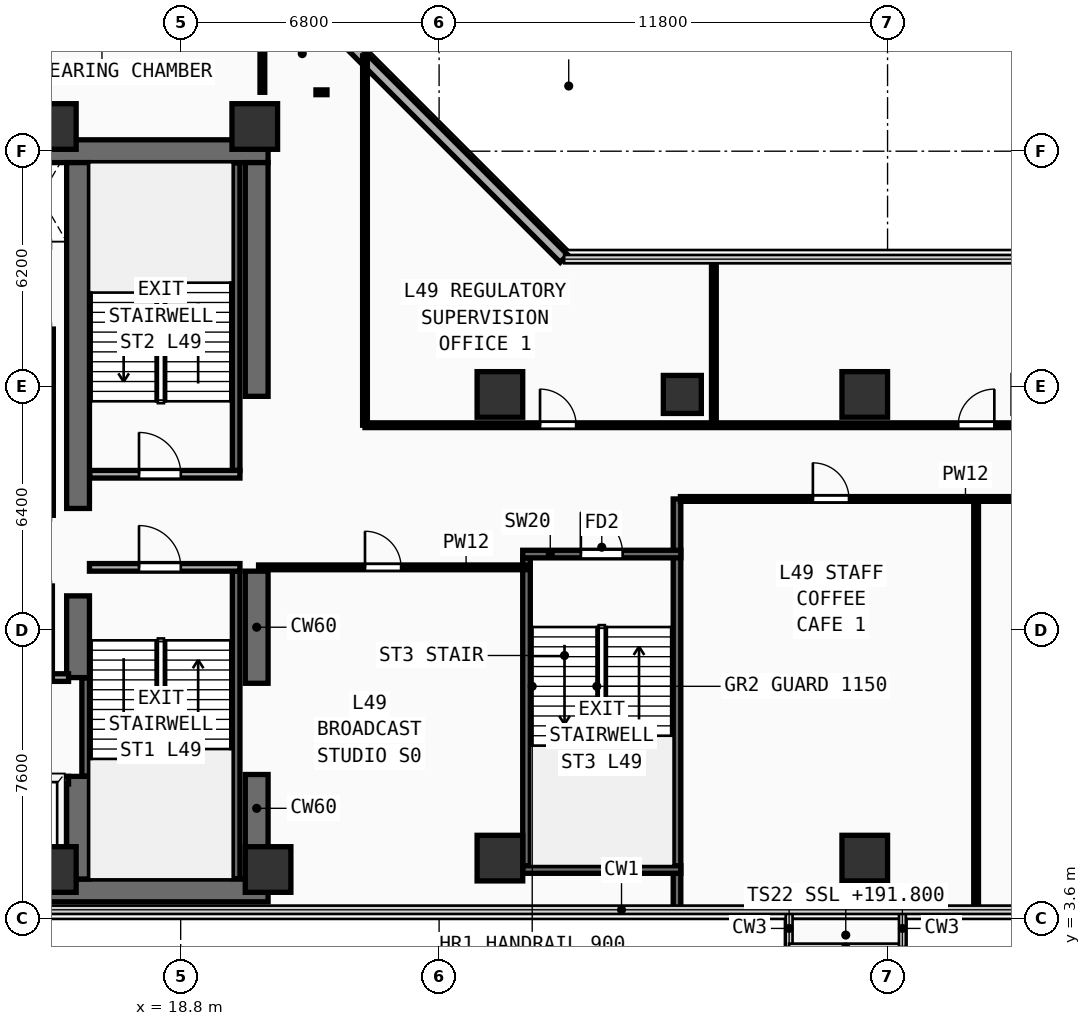
"""IFC4 building model, lengths in metres.
Left out: names, types, materials, properties, quantities, classifications, styles, units other than length and angle.
Written with IfcOpenShell. Run it as: python <this file> out.ifc"""

import sys

from ifc_helpers import new_model, si_unit, direction, frame, frame_2d, origin, origin_2d, place, context, subcontext, project, spatial, rectangle, extrude, element, fill, save


model = new_model("IFC4")
c1 = context("Model", 3, precision=1e-05, world=origin(), true_north=direction((0.0, 1.0)))
c2 = subcontext(c1, "Body", "Model", "MODEL_VIEW")
j1 = project(units=[si_unit("LENGTHUNIT", "METRE"), si_unit("PLANEANGLEUNIT", "RADIAN")], contexts=[c1])
p1 = place(None, origin())
s1 = spatial("IfcSite", under=j1, at=p1, CompositionType="ELEMENT")
p2 = place(p1, origin())
s2 = spatial("IfcBuilding", under=s1, at=p2, CompositionType="ELEMENT")
p3 = place(p2, frame((0.0, 0.0, 191.8)))
s3 = spatial("IfcBuildingStorey", under=s2, at=p3, CompositionType="ELEMENT", Elevation=191.8)
for number, where, z_axis, x_axis in (
    (1, (7.15, 4.35, 0.0), (0.0, 0.0, 1.0), (1.0, 0.0, 0.0)),
    (2, (7.15, 23.8, 0.0), (0.0, 0.0, 1.0), (1.0, 0.0, 0.0)),
):
    element("IfcWall", number, at=place(p3, frame(where, z_axis=z_axis, x_axis=x_axis)), inside=s3, PredefinedType="SHEAR", context=c2, shape_type="SweptSolid", body=[
        extrude(rectangle(XDim=13.95, YDim=0.6, at=frame_2d((6.975, 0.0))), origin(), (0.0, 0.0, 1.0), 3.56),
    ])
p4 = place(p3, frame((20.8, 4.65, 0.0), z_axis=(0.0, 0.0, 1.0), x_axis=(0.0, 1.0, 0.0)))
e3 = element("IfcWall", 3, at=p4, inside=s3, PredefinedType="SHEAR", context=c2, shape_type="SweptSolid", body=[
    extrude(rectangle(XDim=2.75, YDim=0.6, at=frame_2d((1.375, 0.0))), origin(), (0.0, 0.0, 1.0), 3.56),
])
p5 = place(p3, frame((20.8, 9.8, 0.0), z_axis=(0.0, 0.0, 1.0), x_axis=(0.0, 1.0, 0.0)))
e4 = element("IfcWall", 4, at=p5, inside=s3, PredefinedType="SHEAR", context=c2, shape_type="SweptSolid", body=[
    extrude(rectangle(XDim=2.95, YDim=0.6, at=frame_2d((1.475, 0.0))), origin(), (0.0, 0.0, 1.0), 3.56),
])
p6 = place(p3, frame((20.8, 17.35, 0.0), z_axis=(0.0, 0.0, 1.0), x_axis=(0.0, 1.0, 0.0)))
e5 = element("IfcWall", 5, at=p6, inside=s3, PredefinedType="SHEAR", context=c2, shape_type="SweptSolid", body=[
    extrude(rectangle(XDim=6.15, YDim=0.6, at=frame_2d((3.075, 0.0))), origin(), (0.0, 0.0, 1.0), 3.56),
])
p7 = place(p3, frame((16.1, 4.65, 0.0), z_axis=(0.0, 0.0, 1.0), x_axis=(0.0, 1.0, 0.0)))
e6 = element("IfcWall", 6, at=p7, inside=s3, PredefinedType="SHEAR", context=c2, shape_type="SweptSolid", body=[
    extrude(rectangle(XDim=2.7, YDim=0.6, at=frame_2d((1.35, 0.0))), origin(), (0.0, 0.0, 1.0), 3.56),
])
p8 = place(p3, frame((16.1, 9.95, 0.0), z_axis=(0.0, 0.0, 1.0), x_axis=(0.0, 1.0, 0.0)))
e7 = element("IfcWall", 7, at=p8, inside=s3, PredefinedType="SHEAR", context=c2, shape_type="SweptSolid", body=[
    extrude(rectangle(XDim=2.15, YDim=0.6, at=frame_2d((1.075, 0.0))), origin(), (0.0, 0.0, 1.0), 3.56),
])
p9 = place(p3, frame((16.1, 14.4, 0.0), z_axis=(0.0, 0.0, 1.0), x_axis=(0.0, 1.0, 0.0)))
e8 = element("IfcWall", 8, at=p9, inside=s3, PredefinedType="SHEAR", context=c2, shape_type="SweptSolid", body=[
    extrude(rectangle(XDim=9.1, YDim=0.6, at=frame_2d((4.55, 0.0))), origin(), (0.0, 0.0, 1.0), 3.56),
])
for number, where, z_axis, x_axis in (
    (9, (15.45, 4.9, 0.0), (0.0, 0.0, 1.0), (1.0, 0.0, 0.0)),
    (10, (21.1, 4.9, 0.0), (0.0, 0.0, 1.0), (1.0, 0.0, 0.0)),
    (11, (15.45, 24.45, 0.0), (0.0, 0.0, 1.0), (1.0, 0.0, 0.0)),
    (12, (20.75, 24.45, 0.0), (0.0, 0.0, 1.0), (1.0, 0.0, 0.0)),
    (13, (27.2, 5.2, 0.0), (0.0, 0.0, 1.0), (1.0, 0.0, 0.0)),
    (14, (36.8, 5.2, 0.0), (0.0, 0.0, 1.0), (1.0, 0.0, 0.0)),
    (15, (27.2, 17.4, 0.0), (0.0, 0.0, 1.0), (1.0, 0.0, 0.0)),
    (16, (36.8, 17.4, 0.0), (0.0, 0.0, 1.0), (1.0, 0.0, 0.0)),
):
    element("IfcColumn", number, at=place(p3, frame(where, z_axis=z_axis, x_axis=x_axis)), inside=s3, PredefinedType="COLUMN", context=c2, shape_type="SweptSolid", body=[
        extrude(rectangle(XDim=1.2, YDim=1.2, at=origin_2d()), origin(), (0.0, 0.0, 1.0), 3.56),
    ])
p10 = place(p3, frame((32.0, 17.4, 0.0), z_axis=(0.0, 0.0, 1.0), x_axis=(1.0, 0.0, 0.0)))
e17 = element("IfcColumn", 17, at=p10, inside=s3, PredefinedType="COLUMN", context=c2, shape_type="SweptSolid", body=[
    extrude(rectangle(XDim=1.0, YDim=1.0, at=origin_2d()), origin(), (0.0, 0.0, 1.0), 3.56),
])
p11 = place(p3, frame((28.885, 20.975, 0.0), z_axis=(0.0, 0.0, 1.0), x_axis=(-0.707106781187, 0.707106781187, 0.0)))
e18 = element("IfcWall", 18, at=p11, inside=s3, PredefinedType="SOLIDWALL", context=c2, shape_type="SweptSolid", body=[
    extrude(rectangle(XDim=9.207, YDim=0.28, at=frame_2d((4.603, 0.0))), origin(), (0.0, 0.0, 1.0), 3.56),
])
p12 = place(p3, frame((16.3, 7.36, 0.0), z_axis=(0.0, 0.0, 1.0), x_axis=(0.0, 1.0, 0.0)))
e19 = element("IfcWall", 19, at=p12, inside=s3, PredefinedType="SHEAR", context=c2, shape_type="SweptSolid", body=[
    extrude(rectangle(XDim=2.58, YDim=0.2, at=frame_2d((1.29, 0.0))), origin(), (0.0, 0.0, 1.0), 3.56),
])
p13 = place(p3, frame((20.26, 4.66, 0.0), z_axis=(0.0, 0.0, 1.0), x_axis=(0.0, 1.0, 0.0)))
e20 = element("IfcWall", 20, at=p13, inside=s3, PredefinedType="SHEAR", context=c2, shape_type="SweptSolid", body=[
    extrude(rectangle(XDim=8.09, YDim=0.2, at=frame_2d((4.045, 0.0))), origin(), (0.0, 0.0, 1.0), 3.56),
])
p14 = place(p3, frame((16.4, 12.85, 0.0), z_axis=(0.0, 0.0, 1.0), x_axis=(1.0, 0.0, 0.0)))
e21 = element("IfcWall", 21, at=p14, inside=s3, PredefinedType="PARTITIONING", context=c2, shape_type="SweptSolid", body=[
    extrude(rectangle(XDim=3.96, YDim=0.2, at=frame_2d((1.98, 0.0))), origin(), (0.0, 0.0, 1.0), 3.56),
])
p15 = place(p14, frame((1.304, 0.0, 0.0)))
e22 = element("IfcOpeningElement", 22, at=p15, cuts=e21, PredefinedType="OPENING", context=c2, shape_type="SweptSolid", body=[
    extrude(rectangle(XDim=1.1, YDim=2.2, at=frame_2d((0.55, 1.1))), frame((0.0, 0.11, 0.0), z_axis=(0.0, -1.0, 0.0), x_axis=(1.0, 0.0, 0.0)), (0.0, 0.0, 1.0), 0.22),
])
p16 = place(p3, frame((20.26, 15.4, 0.0), z_axis=(0.0, 0.0, 1.0), x_axis=(0.0, 1.0, 0.0)))
e23 = element("IfcWall", 23, at=p16, inside=s3, PredefinedType="SHEAR", context=c2, shape_type="SweptSolid", body=[
    extrude(rectangle(XDim=8.09, YDim=0.2, at=frame_2d((4.045, 0.0))), origin(), (0.0, 0.0, 1.0), 3.56),
])
p17 = place(p3, frame((16.41, 15.3, 0.0), z_axis=(0.0, 0.0, 1.0), x_axis=(1.0, 0.0, 0.0)))
e24 = element("IfcWall", 24, at=p17, inside=s3, PredefinedType="PARTITIONING", context=c2, shape_type="SweptSolid", body=[
    extrude(rectangle(XDim=3.95, YDim=0.2, at=frame_2d((1.975, 0.0))), origin(), (0.0, 0.0, 1.0), 3.56),
])
p18 = place(p17, frame((1.294, 0.0, 0.0)))
e25 = element("IfcOpeningElement", 25, at=p18, cuts=e24, PredefinedType="OPENING", context=c2, shape_type="SweptSolid", body=[
    extrude(rectangle(XDim=1.1, YDim=2.2, at=frame_2d((0.55, 1.1))), frame((0.0, 0.11, 0.0), z_axis=(0.0, -1.0, 0.0), x_axis=(1.0, 0.0, 0.0)), (0.0, 0.0, 1.0), 0.22),
])
p19 = place(p3, frame((27.9, 5.0, 0.0), z_axis=(0.0, 0.0, 1.0), x_axis=(0.0, 1.0, 0.0)))
e26 = element("IfcWall", 26, at=p19, inside=s3, PredefinedType="SHEAR", context=c2, shape_type="SweptSolid", body=[
    extrude(rectangle(XDim=8.1, YDim=0.2, at=frame_2d((4.05, 0.0))), origin(), (0.0, 0.0, 1.0), 3.56),
])
p20 = place(p3, frame((31.86, 3.84, 0.0), z_axis=(0.0, 0.0, 1.0), x_axis=(0.0, 1.0, 0.0)))
e27 = element("IfcWall", 27, at=p20, inside=s3, PredefinedType="SHEAR", context=c2, shape_type="SweptSolid", body=[
    extrude(rectangle(XDim=10.81, YDim=0.2, at=frame_2d((5.405, 0.0))), origin(), (0.0, 0.0, 1.0), 3.56),
])
p21 = place(p3, frame((27.8, 4.9, 0.0), z_axis=(0.0, 0.0, 1.0), x_axis=(1.0, 0.0, 0.0)))
e28 = element("IfcWall", 28, at=p21, inside=s3, PredefinedType="SHEAR", context=c2, shape_type="SweptSolid", body=[
    extrude(rectangle(XDim=4.16, YDim=0.2, at=frame_2d((2.08, 0.0))), origin(), (0.0, 0.0, 1.0), 3.56),
])
p22 = place(p3, frame((27.8, 13.2, 0.0), z_axis=(0.0, 0.0, 1.0), x_axis=(1.0, 0.0, 0.0)))
e29 = element("IfcWall", 29, at=p22, inside=s3, PredefinedType="SHEAR", context=c2, shape_type="SweptSolid", body=[
    extrude(rectangle(XDim=4.16, YDim=0.2, at=frame_2d((2.08, 0.0))), origin(), (0.0, 0.0, 1.0), 3.56),
])
p23 = place(p22, frame((1.53, 0.0, 0.0)))
e30 = element("IfcOpeningElement", 30, at=p23, cuts=e29, PredefinedType="OPENING", context=c2, shape_type="SweptSolid", body=[
    extrude(rectangle(XDim=1.1, YDim=2.2, at=frame_2d((0.55, 1.1))), frame((0.0, 0.11, 0.0), z_axis=(0.0, -1.0, 0.0), x_axis=(1.0, 0.0, 0.0)), (0.0, 0.0, 1.0), 0.22),
])
p24 = place(p3, frame((7.5, 7.25, 0.0), z_axis=(0.0, 0.0, 1.0), x_axis=(1.0, 0.0, 0.0)))
e31 = element("IfcWall", 31, at=p24, inside=s3, PredefinedType="PARTITIONING", context=c2, shape_type="SweptSolid", body=[
    extrude(rectangle(XDim=8.35, YDim=0.2, at=frame_2d((4.175, 0.0))), origin(), (0.0, 0.0, 1.0), 3.56),
])
p25 = place(p24, frame((0.53, 0.0, 0.0)))
e32 = element("IfcOpeningElement", 32, at=p25, cuts=e31, PredefinedType="OPENING", context=c2, shape_type="SweptSolid", body=[
    extrude(rectangle(XDim=1.1, YDim=2.2, at=frame_2d((0.55, 1.1))), frame((0.0, 0.11, 0.0), z_axis=(0.0, -1.0, 0.0), x_axis=(1.0, 0.0, 0.0)), (0.0, 0.0, 1.0), 0.22),
])
p26 = place(p24, frame((2.37, 0.0, 0.0)))
e33 = element("IfcOpeningElement", 33, at=p26, cuts=e31, PredefinedType="OPENING", context=c2, shape_type="SweptSolid", body=[
    extrude(rectangle(XDim=1.1, YDim=2.2, at=frame_2d((0.55, 1.1))), frame((0.0, 0.11, 0.0), z_axis=(0.0, -1.0, 0.0), x_axis=(1.0, 0.0, 0.0)), (0.0, 0.0, 1.0), 0.22),
])
p27 = place(p24, frame((4.33, 0.0, 0.0)))
e34 = element("IfcOpeningElement", 34, at=p27, cuts=e31, PredefinedType="OPENING", context=c2, shape_type="SweptSolid", body=[
    extrude(rectangle(XDim=1.1, YDim=2.2, at=frame_2d((0.55, 1.1))), frame((0.0, 0.11, 0.0), z_axis=(0.0, -1.0, 0.0), x_axis=(1.0, 0.0, 0.0)), (0.0, 0.0, 1.0), 0.22),
])
p28 = place(p24, frame((6.5, 0.0, 0.0)))
e35 = element("IfcOpeningElement", 35, at=p28, cuts=e31, PredefinedType="OPENING", context=c2, shape_type="SweptSolid", body=[
    extrude(rectangle(XDim=1.1, YDim=2.2, at=frame_2d((0.55, 1.1))), frame((0.0, 0.11, 0.0), z_axis=(0.0, -1.0, 0.0), x_axis=(1.0, 0.0, 0.0)), (0.0, 0.0, 1.0), 0.22),
])
p29 = place(p3, frame((7.5, 9.95, 0.0), z_axis=(0.0, 0.0, 1.0), x_axis=(1.0, 0.0, 0.0)))
e36 = element("IfcWall", 36, at=p29, inside=s3, PredefinedType="PARTITIONING", context=c2, shape_type="SweptSolid", body=[
    extrude(rectangle(XDim=8.35, YDim=0.2, at=frame_2d((4.175, 0.0))), origin(), (0.0, 0.0, 1.0), 3.56),
])
p30 = place(p3, frame((15.35, 9.95, 0.0), z_axis=(0.0, 0.0, 1.0), x_axis=(0.0, 1.0, 0.0)))
e37 = element("IfcWall", 37, at=p30, inside=s3, PredefinedType="PARTITIONING", context=c2, shape_type="SweptSolid", body=[
    extrude(rectangle(XDim=2.41, YDim=0.15, at=frame_2d((1.205, 0.0))), origin(), (0.0, 0.0, 1.0), 3.56),
])
p31 = place(p3, frame((15.35, 14.22, 0.0), z_axis=(0.0, 0.0, 1.0), x_axis=(0.0, 1.0, 0.0)))
e38 = element("IfcWall", 38, at=p31, inside=s3, PredefinedType="PARTITIONING", context=c2, shape_type="SweptSolid", body=[
    extrude(rectangle(XDim=2.23, YDim=0.2, at=frame_2d((1.115, 0.0))), origin(), (0.0, 0.0, 1.0), 3.56),
])
p32 = place(p3, frame((15.35, 16.45, 0.0), z_axis=(0.0, 0.0, 1.0), x_axis=(0.0, 1.0, 0.0)))
e39 = element("IfcWall", 39, at=p32, inside=s3, PredefinedType="PARTITIONING", context=c2, shape_type="SweptSolid", body=[
    extrude(rectangle(XDim=2.67, YDim=0.2, at=frame_2d((1.335, 0.0))), origin(), (0.0, 0.0, 1.0), 3.56),
])
p33 = place(p3, frame((20.85, 12.85, 0.0), z_axis=(0.0, 0.0, 1.0), x_axis=(1.0, 0.0, 0.0)))
e40 = element("IfcWall", 40, at=p33, inside=s3, PredefinedType="PARTITIONING", context=c2, shape_type="SweptSolid", body=[
    extrude(rectangle(XDim=7.05, YDim=0.125, at=frame_2d((3.525, 0.0))), origin(), (0.0, 0.0, 1.0), 3.56),
])
p34 = place(p33, frame((2.8, 0.0, 0.0)))
e41 = element("IfcOpeningElement", 41, at=p34, cuts=e40, PredefinedType="OPENING", context=c2, shape_type="SweptSolid", body=[
    extrude(rectangle(XDim=0.95, YDim=2.15, at=frame_2d((0.475, 1.075))), frame((0.0, 0.073, 0.0), z_axis=(0.0, -1.0, 0.0), x_axis=(1.0, 0.0, 0.0)), (0.0, 0.0, 1.0), 0.145),
])
p35 = place(p3, frame((20.95, 25.35, 0.0), z_axis=(0.0, 0.0, 1.0), x_axis=(0.0, 1.0, 0.0)))
e42 = element("IfcWall", 42, at=p35, inside=s3, PredefinedType="PARTITIONING", context=c2, shape_type="SweptSolid", body=[
    extrude(rectangle(XDim=9.25, YDim=0.125, at=frame_2d((4.625, 0.0))), origin(), (0.0, 0.0, 1.0), 3.56),
])
p36 = place(p35, frame((3.973, 0.0, 0.0)))
e43 = element("IfcOpeningElement", 43, at=p36, cuts=e42, PredefinedType="OPENING", context=c2, shape_type="SweptSolid", body=[
    extrude(rectangle(XDim=0.85, YDim=2.15, at=frame_2d((0.425, 1.075))), frame((0.0, 0.073, 0.0), z_axis=(0.0, -1.0, 0.0), x_axis=(1.0, 0.0, 0.0)), (0.0, 0.0, 1.0), 0.145),
])
p37 = place(p3, frame((22.65, 25.35, 0.0), z_axis=(0.0, 0.0, 1.0), x_axis=(-1.0, 0.0, 0.0)))
e44 = element("IfcWall", 44, at=p37, inside=s3, PredefinedType="PARTITIONING", context=c2, shape_type="SweptSolid", body=[
    extrude(rectangle(XDim=0.29, YDim=0.125, at=frame_2d((0.145, 0.0))), origin(), (0.0, 0.0, 1.0), 3.56),
])
p38 = place(p3, frame((31.95, 14.65, 0.0), z_axis=(0.0, 0.0, 1.0), x_axis=(1.0, 0.0, 0.0)))
e45 = element("IfcWall", 45, at=p38, inside=s3, PredefinedType="PARTITIONING", context=c2, shape_type="SweptSolid", body=[
    extrude(rectangle(XDim=15.25, YDim=0.125, at=frame_2d((7.625, 0.0))), origin(), (0.0, 0.0, 1.0), 3.56),
])
p39 = place(p38, frame((3.485, 0.0, 0.0)))
e46 = element("IfcOpeningElement", 46, at=p39, cuts=e45, PredefinedType="OPENING", context=c2, shape_type="SweptSolid", body=[
    extrude(rectangle(XDim=0.95, YDim=2.15, at=frame_2d((0.475, 1.075))), frame((0.0, 0.073, 0.0), z_axis=(0.0, -1.0, 0.0), x_axis=(1.0, 0.0, 0.0)), (0.0, 0.0, 1.0), 0.145),
])
p40 = place(p38, frame((10.565, 0.0, 0.0)))
e47 = element("IfcOpeningElement", 47, at=p40, cuts=e45, PredefinedType="OPENING", context=c2, shape_type="SweptSolid", body=[
    extrude(rectangle(XDim=0.95, YDim=2.15, at=frame_2d((0.475, 1.075))), frame((0.0, 0.073, 0.0), z_axis=(0.0, -1.0, 0.0), x_axis=(1.0, 0.0, 0.0)), (0.0, 0.0, 1.0), 0.145),
])
p41 = place(p3, frame((39.73, 3.84, 0.0), z_axis=(0.0, 0.0, 1.0), x_axis=(0.0, 1.0, 0.0)))
e48 = element("IfcWall", 48, at=p41, inside=s3, PredefinedType="PARTITIONING", context=c2, shape_type="SweptSolid", body=[
    extrude(rectangle(XDim=10.81, YDim=0.125, at=frame_2d((5.405, 0.0))), origin(), (0.0, 0.0, 1.0), 3.56),
])
p42 = place(p3, frame((23.65, 16.59, 0.0), z_axis=(0.0, 0.0, 1.0), x_axis=(0.0, 1.0, 0.0)))
e49 = element("IfcWall", 49, at=p42, inside=s3, PredefinedType="PARTITIONING", context=c2, shape_type="SweptSolid", body=[
    extrude(rectangle(XDim=9.72, YDim=0.125, at=frame_2d((4.86, 0.0))), origin(), (0.0, 0.0, 1.0), 3.56),
])
p43 = place(p3, frame((23.65, 16.59, 0.0), z_axis=(0.0, 0.0, 1.0), x_axis=(1.0, 0.0, 0.0)))
e50 = element("IfcWall", 50, at=p43, inside=s3, PredefinedType="PARTITIONING", context=c2, shape_type="SweptSolid", body=[
    extrude(rectangle(XDim=23.55, YDim=0.125, at=frame_2d((11.775, 0.0))), origin(), (0.0, 0.0, 1.0), 3.56),
])
p44 = place(p43, frame((4.606, 0.0, 0.0)))
e51 = element("IfcOpeningElement", 51, at=p44, cuts=e50, PredefinedType="OPENING", context=c2, shape_type="SweptSolid", body=[
    extrude(rectangle(XDim=0.95, YDim=2.15, at=frame_2d((0.475, 1.075))), frame((0.0, 0.073, 0.0), z_axis=(0.0, -1.0, 0.0), x_axis=(1.0, 0.0, 0.0)), (0.0, 0.0, 1.0), 0.145),
])
p45 = place(p43, frame((15.61, 0.0, 0.0)))
e52 = element("IfcOpeningElement", 52, at=p45, cuts=e50, PredefinedType="OPENING", context=c2, shape_type="SweptSolid", body=[
    extrude(rectangle(XDim=0.95, YDim=2.15, at=frame_2d((0.475, 1.075))), frame((0.0, 0.073, 0.0), z_axis=(0.0, -1.0, 0.0), x_axis=(1.0, 0.0, 0.0)), (0.0, 0.0, 1.0), 0.145),
])
p46 = place(p3, frame((32.83, 16.59, 0.0), z_axis=(0.0, 0.0, 1.0), x_axis=(0.0, 1.0, 0.0)))
e53 = element("IfcWall", 53, at=p46, inside=s3, PredefinedType="PARTITIONING", context=c2, shape_type="SweptSolid", body=[
    extrude(rectangle(XDim=4.37, YDim=0.125, at=frame_2d((2.185, 0.0))), origin(), (0.0, 0.0, 1.0), 3.56),
])
p47 = place(p15, frame((1.1, 0.0, 0.0), z_axis=(0.0, 0.0, 1.0), x_axis=(-1.0, 0.0, 0.0)))
e54 = element("IfcDoor", 54, at=p47, inside=s3, OperationType="SINGLE_SWING_RIGHT", PredefinedType="DOOR", context=c2, shape_type="SweptSolid", body=[
    extrude(rectangle(XDim=1.1, YDim=2.2, at=frame_2d((0.55, 1.1))), frame((0.0, 0.025, 0.0), z_axis=(0.0, -1.0, 0.0), x_axis=(1.0, 0.0, 0.0)), (0.0, 0.0, 1.0), 0.05),
])
fill(e22, e54)
p48 = place(p18, origin())
e55 = element("IfcDoor", 55, at=p48, inside=s3, OperationType="SINGLE_SWING_LEFT", PredefinedType="DOOR", context=c2, shape_type="SweptSolid", body=[
    extrude(rectangle(XDim=1.1, YDim=2.2, at=frame_2d((0.55, 1.1))), frame((0.0, 0.025, 0.0), z_axis=(0.0, -1.0, 0.0), x_axis=(1.0, 0.0, 0.0)), (0.0, 0.0, 1.0), 0.05),
])
fill(e25, e55)
p49 = place(p23, frame((1.1, 0.0, 0.0), z_axis=(0.0, 0.0, 1.0), x_axis=(-1.0, 0.0, 0.0)))
e56 = element("IfcDoor", 56, at=p49, inside=s3, OperationType="SINGLE_SWING_RIGHT", PredefinedType="DOOR", context=c2, shape_type="SweptSolid", body=[
    extrude(rectangle(XDim=1.1, YDim=2.2, at=frame_2d((0.55, 1.1))), frame((0.0, 0.025, 0.0), z_axis=(0.0, -1.0, 0.0), x_axis=(1.0, 0.0, 0.0)), (0.0, 0.0, 1.0), 0.05),
])
fill(e30, e56)
p50 = place(p34, origin())
e57 = element("IfcDoor", 57, at=p50, inside=s3, OperationType="SINGLE_SWING_LEFT", PredefinedType="DOOR", context=c2, shape_type="SweptSolid", body=[
    extrude(rectangle(XDim=0.95, YDim=2.15, at=frame_2d((0.475, 1.075))), frame((0.0, 0.025, 0.0), z_axis=(0.0, -1.0, 0.0), x_axis=(1.0, 0.0, 0.0)), (0.0, 0.0, 1.0), 0.05),
])
fill(e41, e57)
p51 = place(p39, origin())
e58 = element("IfcDoor", 58, at=p51, inside=s3, OperationType="SINGLE_SWING_LEFT", PredefinedType="DOOR", context=c2, shape_type="SweptSolid", body=[
    extrude(rectangle(XDim=0.95, YDim=2.15, at=frame_2d((0.475, 1.075))), frame((0.0, 0.025, 0.0), z_axis=(0.0, -1.0, 0.0), x_axis=(1.0, 0.0, 0.0)), (0.0, 0.0, 1.0), 0.05),
])
fill(e46, e58)
p52 = place(p44, origin())
e59 = element("IfcDoor", 59, at=p52, inside=s3, OperationType="SINGLE_SWING_LEFT", PredefinedType="DOOR", context=c2, shape_type="SweptSolid", body=[
    extrude(rectangle(XDim=0.95, YDim=2.15, at=frame_2d((0.475, 1.075))), frame((0.0, 0.025, 0.0), z_axis=(0.0, -1.0, 0.0), x_axis=(1.0, 0.0, 0.0)), (0.0, 0.0, 1.0), 0.05),
])
fill(e51, e59)
p53 = place(p45, origin())
e60 = element("IfcDoor", 60, at=p53, inside=s3, OperationType="SINGLE_SWING_RIGHT", PredefinedType="DOOR", context=c2, shape_type="SweptSolid", body=[
    extrude(rectangle(XDim=0.95, YDim=2.15, at=frame_2d((0.475, 1.075))), frame((0.0, 0.025, 0.0), z_axis=(0.0, -1.0, 0.0), x_axis=(1.0, 0.0, 0.0)), (0.0, 0.0, 1.0), 0.05),
])
fill(e52, e60)
save(model, sys.argv[1])
